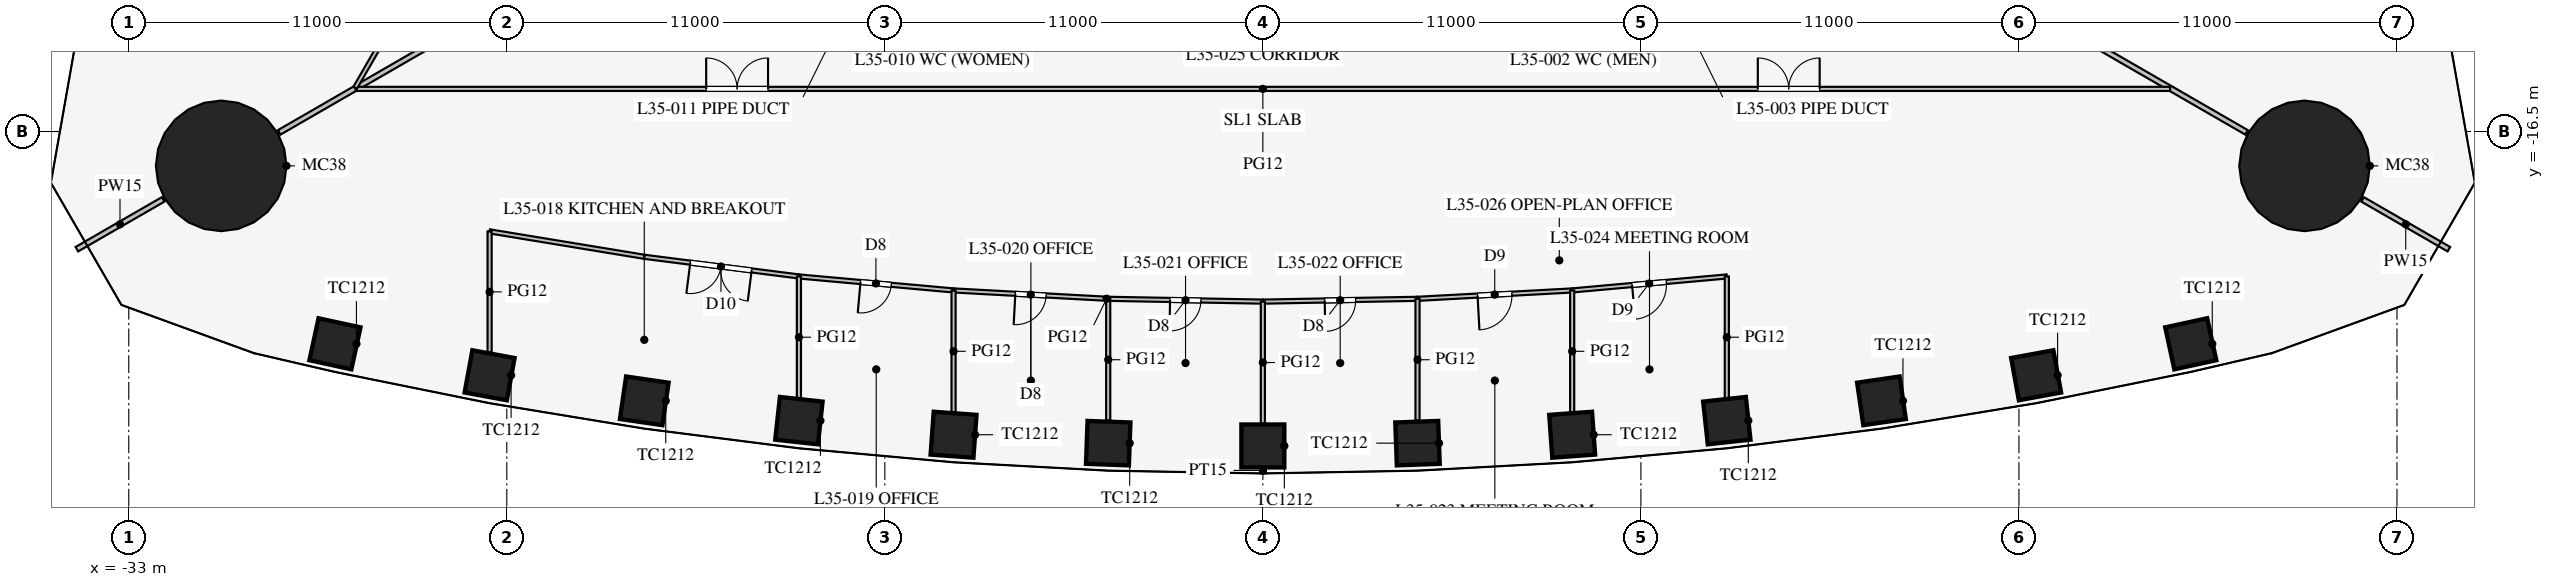
"""IFC4 building model, lengths in metres.
Left out: names, types, materials, properties, quantities, classifications, styles, units other than length and angle.
Written with IfcOpenShell. Run it as: python <this file> out.ifc"""

import sys

from ifc_helpers import new_model, si_unit, direction, frame, frame_2d, origin, origin_2d, place, context, subcontext, project, spatial, rectangle, circle, extrude, element, fill, save


model = new_model("IFC4")
c1 = context("Model", 3, precision=1e-05, world=origin(), true_north=direction((0.0, 1.0)))
c2 = subcontext(c1, "Body", "Model", "MODEL_VIEW")
j1 = project(units=[si_unit("LENGTHUNIT", "METRE"), si_unit("PLANEANGLEUNIT", "RADIAN")], contexts=[c1])
p1 = place(None, origin())
s1 = spatial("IfcSite", under=j1, at=p1, CompositionType="ELEMENT")
p2 = place(p1, origin())
s2 = spatial("IfcBuilding", under=s1, at=p2, CompositionType="ELEMENT")
p3 = place(p2, frame((0.0, 0.0, 153.5)))
s3 = spatial("IfcBuildingStorey", under=s2, at=p3, CompositionType="ELEMENT", Elevation=153.5)
for number, where, z_axis, x_axis in (
    (1, (-27.0, -22.677, 0.0), (0.0, 0.0, 1.0), (0.977, -0.212, 0.0)),
    (2, (-22.5, -23.593, 0.0), (0.0, 0.0, 1.0), (0.984, -0.18, 0.0)),
    (3, (-18.0, -24.337, 0.0), (0.0, 0.0, 1.0), (0.99, -0.144, 0.0)),
    (4, (-13.5, -24.913, 0.0), (0.0, 0.0, 1.0), (0.994, -0.108, 0.0)),
    (5, (-9.0, -25.323, 0.0), (0.0, 0.0, 1.0), (0.997, -0.072, 0.0)),
    (6, (-4.5, -25.568, 0.0), (0.0, 0.0, 1.0), (0.999, -0.036, 0.0)),
    (7, (0.0, -25.65, 0.0), (0.0, 0.0, 1.0), (1.0, 0.0, 0.0)),
    (8, (4.5, -25.568, 0.0), (0.0, 0.0, 1.0), (0.999, 0.036, 0.0)),
    (9, (9.0, -25.323, 0.0), (0.0, 0.0, 1.0), (0.997, 0.072, 0.0)),
    (10, (13.5, -24.913, 0.0), (0.0, 0.0, 1.0), (0.994, 0.108, 0.0)),
    (11, (18.0, -24.337, 0.0), (0.0, 0.0, 1.0), (0.99, 0.144, 0.0)),
    (12, (22.5, -23.593, 0.0), (0.0, 0.0, 1.0), (0.984, 0.18, 0.0)),
    (13, (27.0, -22.677, 0.0), (0.0, 0.0, 1.0), (0.977, 0.212, 0.0)),
):
    element("IfcColumn", number, at=place(p3, frame(where, z_axis=z_axis, x_axis=x_axis)), inside=s3, PredefinedType="COLUMN", context=c2, shape_type="SweptSolid", body=[
        extrude(rectangle(XDim=1.25, YDim=1.25, at=origin_2d()), origin(), (0.0, 0.0, 1.0), 4.2),
    ])
for number, where, z_axis, x_axis in (
    (14, (30.311, -17.5, 0.0), (0.0, 0.0, 1.0), (1.0, 0.0, 0.0)),
    (15, (-30.311, -17.5, 0.0), (0.0, 0.0, 1.0), (1.0, 0.0, 0.0)),
):
    element("IfcColumn", number, at=place(p3, frame(where, z_axis=z_axis, x_axis=x_axis)), inside=s3, PredefinedType="COLUMN", context=c2, shape_type="SweptSolid", body=[
        extrude(circle(Radius=1.9, at=origin_2d()), origin(), (0.0, 0.0, 1.0), 4.2),
    ])
p4 = place(p3, frame((14.203, -8.2, 0.0), z_axis=(0.0, 0.0, 1.0), x_axis=(0.866024668836, -0.500001272966, 0.0)))
e16 = element("IfcWall", 16, at=p4, inside=s3, PredefinedType="PARTITIONING", context=c2, shape_type="SweptSolid", body=[
    extrude(rectangle(XDim=16.65, YDim=0.15, at=frame_2d((8.325, 0.0))), origin(), (0.0, 0.0, 1.0), 2.3),
])
p5 = place(p3, frame((32.0, -18.475, 0.0), z_axis=(0.0, 0.0, 1.0), x_axis=(0.866042548026, -0.499970304126, 0.0)))
e17 = element("IfcWall", 17, at=p5, inside=s3, PredefinedType="PARTITIONING", context=c2, shape_type="SweptSolid", body=[
    extrude(rectangle(XDim=2.899, YDim=0.15, at=frame_2d((1.45, 0.0))), origin(), (0.0, 0.0, 1.0), 2.3),
])
p6 = place(p3, frame((-14.203, -8.2, 0.0), z_axis=(0.0, 0.0, 1.0), x_axis=(-0.866024668836, -0.500001272966, 0.0)))
e18 = element("IfcWall", 18, at=p6, inside=s3, PredefinedType="PARTITIONING", context=c2, shape_type="SweptSolid", body=[
    extrude(rectangle(XDim=16.65, YDim=0.15, at=frame_2d((8.325, 0.0))), origin(), (0.0, 0.0, 1.0), 2.3),
])
p7 = place(p3, frame((-32.0, -18.475, 0.0), z_axis=(0.0, 0.0, 1.0), x_axis=(-0.866042548026, -0.499970304126, 0.0)))
e19 = element("IfcWall", 19, at=p7, inside=s3, PredefinedType="PARTITIONING", context=c2, shape_type="SweptSolid", body=[
    extrude(rectangle(XDim=2.899, YDim=0.15, at=frame_2d((1.45, 0.0))), origin(), (0.0, 0.0, 1.0), 2.3),
])
p8 = place(p3, frame((-26.398, -15.26, 0.0), z_axis=(0.0, 0.0, 1.0), x_axis=(1.0, 0.0, 0.0)))
e20 = element("IfcWall", 20, at=p8, inside=s3, PredefinedType="PARTITIONING", context=c2, shape_type="SweptSolid", body=[
    extrude(rectangle(XDim=52.796, YDim=0.12, at=frame_2d((26.398, 0.0))), origin(), (0.0, 0.0, 1.0), 2.9),
])
p9 = place(p8, frame((10.2, 0.0, 0.15)))
e21 = element("IfcOpeningElement", 21, at=p9, cuts=e20, PredefinedType="OPENING", context=c2, shape_type="SweptSolid", body=[
    extrude(rectangle(XDim=1.8, YDim=2.1, at=frame_2d((0.9, 1.05))), frame((0.0, 0.07, 0.0), z_axis=(0.0, -1.0, 0.0), x_axis=(1.0, 0.0, 0.0)), (0.0, 0.0, 1.0), 0.14),
])
p10 = place(p8, frame((40.8, 0.0, 0.15)))
e22 = element("IfcOpeningElement", 22, at=p10, cuts=e20, PredefinedType="OPENING", context=c2, shape_type="SweptSolid", body=[
    extrude(rectangle(XDim=1.8, YDim=2.1, at=frame_2d((0.9, 1.05))), frame((0.0, 0.07, 0.0), z_axis=(0.0, -1.0, 0.0), x_axis=(1.0, 0.0, 0.0)), (0.0, 0.0, 1.0), 0.14),
])
p11 = place(p3, frame((0.0, -26.279, 0.0), z_axis=(0.0, 0.0, 1.0), x_axis=(0.0, -1.0, 0.0)))
e23 = element("IfcWall", 23, at=p11, inside=s3, PredefinedType="PARTITIONING", context=c2, shape_type="SweptSolid", body=[
    extrude(rectangle(XDim=0.166, YDim=0.15, at=frame_2d((0.083, 0.0))), origin(), (0.0, 0.0, 1.0), 2.9),
])
p12 = place(p3, frame((0.0, -21.45, 0.0), z_axis=(0.0, 0.0, 1.0), x_axis=(0.999837820638, 0.018009231578, 0.0)))
e24 = element("IfcWall", 24, at=p12, inside=s3, PredefinedType="PARTITIONING", context=c2, shape_type="SweptSolid", body=[
    extrude(rectangle(XDim=4.501, YDim=0.12, at=frame_2d((2.25, 0.0))), origin(), (0.0, 0.0, 1.0), 2.9),
])
p13 = place(p12, frame((1.8, 0.0, 0.15)))
e25 = element("IfcOpeningElement", 25, at=p13, cuts=e24, PredefinedType="OPENING", context=c2, shape_type="SweptSolid", body=[
    extrude(rectangle(XDim=0.9, YDim=2.1, at=frame_2d((0.45, 1.05))), frame((0.0, 0.07, 0.0), z_axis=(0.0, -1.0, 0.0), x_axis=(1.0, 0.0, 0.0)), (0.0, 0.0, 1.0), 0.14),
])
p14 = place(p3, frame((4.5, -21.369, 0.0), z_axis=(0.0, 0.0, 1.0), x_axis=(0.998537376538, 0.054065771581, 0.0)))
e26 = element("IfcWall", 26, at=p14, inside=s3, PredefinedType="PARTITIONING", context=c2, shape_type="SweptSolid", body=[
    extrude(rectangle(XDim=4.507, YDim=0.12, at=frame_2d((2.253, 0.0))), origin(), (0.0, 0.0, 1.0), 2.9),
])
p15 = place(p14, frame((1.75, 0.0, 0.15)))
e27 = element("IfcOpeningElement", 27, at=p15, cuts=e26, PredefinedType="OPENING", context=c2, shape_type="SweptSolid", body=[
    extrude(rectangle(XDim=1.0, YDim=2.1, at=frame_2d((0.5, 1.05))), frame((0.0, 0.07, 0.0), z_axis=(0.0, -1.0, 0.0), x_axis=(1.0, 0.0, 0.0)), (0.0, 0.0, 1.0), 0.14),
])
p16 = place(p3, frame((9.0, -21.125, 0.0), z_axis=(0.0, 0.0, 1.0), x_axis=(0.995930325215, 0.090126507295, 0.0)))
e28 = element("IfcWall", 28, at=p16, inside=s3, PredefinedType="PARTITIONING", context=c2, shape_type="SweptSolid", body=[
    extrude(rectangle(XDim=4.518, YDim=0.12, at=frame_2d((2.259, 0.0))), origin(), (0.0, 0.0, 1.0), 2.9),
])
p17 = place(p16, frame((1.75, 0.0, 0.15)))
e29 = element("IfcOpeningElement", 29, at=p17, cuts=e28, PredefinedType="OPENING", context=c2, shape_type="SweptSolid", body=[
    extrude(rectangle(XDim=1.0, YDim=2.1, at=frame_2d((0.5, 1.05))), frame((0.0, 0.07, 0.0), z_axis=(0.0, -1.0, 0.0), x_axis=(1.0, 0.0, 0.0)), (0.0, 0.0, 1.0), 0.14),
])
p18 = place(p3, frame((-13.5, -20.718, 0.0), z_axis=(0.0, 0.0, 1.0), x_axis=(0.995930325215, -0.090126507295, 0.0)))
e30 = element("IfcWall", 30, at=p18, inside=s3, PredefinedType="PARTITIONING", context=c2, shape_type="SweptSolid", body=[
    extrude(rectangle(XDim=4.518, YDim=0.12, at=frame_2d((2.259, 0.0))), origin(), (0.0, 0.0, 1.0), 2.9),
])
p19 = place(p18, frame((1.8, 0.0, 0.15)))
e31 = element("IfcOpeningElement", 31, at=p19, cuts=e30, PredefinedType="OPENING", context=c2, shape_type="SweptSolid", body=[
    extrude(rectangle(XDim=0.9, YDim=2.1, at=frame_2d((0.45, 1.05))), frame((0.0, 0.07, 0.0), z_axis=(0.0, -1.0, 0.0), x_axis=(1.0, 0.0, 0.0)), (0.0, 0.0, 1.0), 0.14),
])
p20 = place(p3, frame((-18.0, -20.146, 0.0), z_axis=(0.0, 0.0, 1.0), x_axis=(0.992010652594, -0.12615413247, 0.0)))
e32 = element("IfcWall", 32, at=p20, inside=s3, PredefinedType="PARTITIONING", context=c2, shape_type="SweptSolid", body=[
    extrude(rectangle(XDim=4.536, YDim=0.12, at=frame_2d((2.268, 0.0))), origin(), (0.0, 0.0, 1.0), 2.9),
])
p21 = place(p20, frame((1.35, 0.0, 0.15)))
e33 = element("IfcOpeningElement", 33, at=p21, cuts=e32, PredefinedType="OPENING", context=c2, shape_type="SweptSolid", body=[
    extrude(rectangle(XDim=1.8, YDim=2.1, at=frame_2d((0.9, 1.05))), frame((0.0, 0.07, 0.0), z_axis=(0.0, -1.0, 0.0), x_axis=(1.0, 0.0, 0.0)), (0.0, 0.0, 1.0), 0.14),
])
p22 = place(p3, frame((-22.5, -19.406, 0.0), z_axis=(0.0, 0.0, 1.0), x_axis=(0.986764681833, -0.162158757664, 0.0)))
e34 = element("IfcWall", 34, at=p22, inside=s3, PredefinedType="PARTITIONING", context=c2, shape_type="SweptSolid", body=[
    extrude(rectangle(XDim=4.56, YDim=0.12, at=frame_2d((2.28, 0.0))), origin(), (0.0, 0.0, 1.0), 2.9),
])
p23 = place(p3, frame((-4.5, -21.369, 0.0), z_axis=(0.0, 0.0, 1.0), x_axis=(0.999837820638, -0.018009231578, 0.0)))
e35 = element("IfcWall", 35, at=p23, inside=s3, PredefinedType="PARTITIONING", context=c2, shape_type="SweptSolid", body=[
    extrude(rectangle(XDim=4.501, YDim=0.12, at=frame_2d((2.25, 0.0))), origin(), (0.0, 0.0, 1.0), 2.9),
])
p24 = place(p23, frame((1.8, 0.0, 0.15)))
e36 = element("IfcOpeningElement", 36, at=p24, cuts=e35, PredefinedType="OPENING", context=c2, shape_type="SweptSolid", body=[
    extrude(rectangle(XDim=0.9, YDim=2.1, at=frame_2d((0.45, 1.05))), frame((0.0, 0.07, 0.0), z_axis=(0.0, -1.0, 0.0), x_axis=(1.0, 0.0, 0.0)), (0.0, 0.0, 1.0), 0.14),
])
p25 = place(p3, frame((-9.0, -21.125, 0.0), z_axis=(0.0, 0.0, 1.0), x_axis=(0.998537376538, -0.054065771581, 0.0)))
e37 = element("IfcWall", 37, at=p25, inside=s3, PredefinedType="PARTITIONING", context=c2, shape_type="SweptSolid", body=[
    extrude(rectangle(XDim=4.507, YDim=0.12, at=frame_2d((2.253, 0.0))), origin(), (0.0, 0.0, 1.0), 2.9),
])
p26 = place(p25, frame((1.8, 0.0, 0.15)))
e38 = element("IfcOpeningElement", 38, at=p26, cuts=e37, PredefinedType="OPENING", context=c2, shape_type="SweptSolid", body=[
    extrude(rectangle(XDim=0.9, YDim=2.1, at=frame_2d((0.45, 1.05))), frame((0.0, 0.07, 0.0), z_axis=(0.0, -1.0, 0.0), x_axis=(1.0, 0.0, 0.0)), (0.0, 0.0, 1.0), 0.14),
])
p27 = place(p3, frame((0.0, -21.45, 0.0), z_axis=(0.0, 0.0, 1.0), x_axis=(0.0, -1.0, 0.0)))
e39 = element("IfcWall", 39, at=p27, inside=s3, PredefinedType="PARTITIONING", context=c2, shape_type="SweptSolid", body=[
    extrude(rectangle(XDim=3.545, YDim=0.12, at=frame_2d((1.772, 0.0))), origin(), (0.0, 0.0, 1.0), 2.8),
])
p28 = place(p3, frame((13.5, -20.718, 0.0), z_axis=(0.0, 0.0, 1.0), x_axis=(0.0, -1.0, 0.0)))
e40 = element("IfcWall", 40, at=p28, inside=s3, PredefinedType="PARTITIONING", context=c2, shape_type="SweptSolid", body=[
    extrude(rectangle(XDim=3.537, YDim=0.12, at=frame_2d((1.768, 0.0))), origin(), (0.0, 0.0, 1.0), 2.6),
])
p29 = place(p3, frame((4.5, -21.369, 0.0), z_axis=(0.0, 0.0, 1.0), x_axis=(0.0, -1.0, 0.0)))
e41 = element("IfcWall", 41, at=p29, inside=s3, PredefinedType="PARTITIONING", context=c2, shape_type="SweptSolid", body=[
    extrude(rectangle(XDim=3.544, YDim=0.12, at=frame_2d((1.772, 0.0))), origin(), (0.0, 0.0, 1.0), 2.8),
])
p30 = place(p3, frame((9.0, -21.125, 0.0), z_axis=(0.0, 0.0, 1.0), x_axis=(0.0, -1.0, 0.0)))
e42 = element("IfcWall", 42, at=p30, inside=s3, PredefinedType="PARTITIONING", context=c2, shape_type="SweptSolid", body=[
    extrude(rectangle(XDim=3.541, YDim=0.12, at=frame_2d((1.771, 0.0))), origin(), (0.0, 0.0, 1.0), 2.9),
])
p31 = place(p3, frame((-13.5, -20.718, 0.0), z_axis=(0.0, 0.0, 1.0), x_axis=(0.0, -1.0, 0.0)))
e43 = element("IfcWall", 43, at=p31, inside=s3, PredefinedType="PARTITIONING", context=c2, shape_type="SweptSolid", body=[
    extrude(rectangle(XDim=3.537, YDim=0.12, at=frame_2d((1.768, 0.0))), origin(), (0.0, 0.0, 1.0), 2.6),
])
p32 = place(p3, frame((-22.5, -19.406, 0.0), z_axis=(0.0, 0.0, 1.0), x_axis=(0.0, -1.0, 0.0)))
e44 = element("IfcWall", 44, at=p32, inside=s3, PredefinedType="PARTITIONING", context=c2, shape_type="SweptSolid", body=[
    extrude(rectangle(XDim=3.521, YDim=0.12, at=frame_2d((1.76, 0.0))), origin(), (0.0, 0.0, 1.0), 2.9),
])
p33 = place(p3, frame((-4.5, -21.369, 0.0), z_axis=(0.0, 0.0, 1.0), x_axis=(0.0, -1.0, 0.0)))
e45 = element("IfcWall", 45, at=p33, inside=s3, PredefinedType="PARTITIONING", context=c2, shape_type="SweptSolid", body=[
    extrude(rectangle(XDim=3.544, YDim=0.12, at=frame_2d((1.772, 0.0))), origin(), (0.0, 0.0, 1.0), 2.8),
])
p34 = place(p3, frame((-9.0, -21.125, 0.0), z_axis=(0.0, 0.0, 1.0), x_axis=(0.0, -1.0, 0.0)))
e46 = element("IfcWall", 46, at=p34, inside=s3, PredefinedType="PARTITIONING", context=c2, shape_type="SweptSolid", body=[
    extrude(rectangle(XDim=3.541, YDim=0.12, at=frame_2d((1.771, 0.0))), origin(), (0.0, 0.0, 1.0), 2.9),
])
p35 = place(p3, frame((-0.016, 30.491, 0.0), z_axis=(0.0, 0.0, 1.0), x_axis=(-0.50000091641, -0.866024874695, 0.0)))
e47 = element("IfcWall", 47, at=p35, inside=s3, PredefinedType="PARTITIONING", context=c2, shape_type="SweptSolid", body=[
    extrude(rectangle(XDim=52.796, YDim=0.12, at=frame_2d((26.398, 0.0))), origin(), (0.0, 0.0, 1.0), 2.9),
])
p36 = place(p35, frame((10.2, 0.0, 0.15)))
e48 = element("IfcOpeningElement", 48, at=p36, cuts=e47, PredefinedType="OPENING", context=c2, shape_type="SweptSolid", body=[
    extrude(rectangle(XDim=1.8, YDim=2.1, at=frame_2d((0.9, 1.05))), frame((0.0, 0.07, 0.0), z_axis=(0.0, -1.0, 0.0), x_axis=(1.0, 0.0, 0.0)), (0.0, 0.0, 1.0), 0.14),
])
p37 = place(p35, frame((40.8, 0.0, 0.15)))
e49 = element("IfcOpeningElement", 49, at=p37, cuts=e47, PredefinedType="OPENING", context=c2, shape_type="SweptSolid", body=[
    extrude(rectangle(XDim=1.8, YDim=2.1, at=frame_2d((0.9, 1.05))), frame((0.0, 0.07, 0.0), z_axis=(0.0, -1.0, 0.0), x_axis=(1.0, 0.0, 0.0)), (0.0, 0.0, 1.0), 0.14),
])
p38 = place(p21, frame((1.8, 0.0, 0.0), z_axis=(0.0, 0.0, 1.0), x_axis=(-1.0, 0.0, 0.0)))
e50 = element("IfcDoor", 50, at=p38, inside=s3, OperationType="DOUBLE_DOOR_SINGLE_SWING", PredefinedType="DOOR", context=c2, shape_type="SweptSolid", body=[
    extrude(rectangle(XDim=1.8, YDim=2.1, at=frame_2d((0.9, 1.05))), frame((0.0, 0.025, 0.0), z_axis=(0.0, -1.0, 0.0), x_axis=(1.0, 0.0, 0.0)), (0.0, 0.0, 1.0), 0.05),
])
fill(e33, e50)
p39 = place(p19, frame((0.9, 0.0, 0.0), z_axis=(0.0, 0.0, 1.0), x_axis=(-1.0, 0.0, 0.0)))
e51 = element("IfcDoor", 51, at=p39, inside=s3, OperationType="SINGLE_SWING_RIGHT", PredefinedType="DOOR", context=c2, shape_type="SweptSolid", body=[
    extrude(rectangle(XDim=0.9, YDim=2.1, at=frame_2d((0.45, 1.05))), frame((0.0, 0.025, 0.0), z_axis=(0.0, -1.0, 0.0), x_axis=(1.0, 0.0, 0.0)), (0.0, 0.0, 1.0), 0.05),
])
fill(e31, e51)
p40 = place(p26, frame((0.9, 0.0, 0.0), z_axis=(0.0, 0.0, 1.0), x_axis=(-1.0, 0.0, 0.0)))
e52 = element("IfcDoor", 52, at=p40, inside=s3, OperationType="SINGLE_SWING_RIGHT", PredefinedType="DOOR", context=c2, shape_type="SweptSolid", body=[
    extrude(rectangle(XDim=0.9, YDim=2.1, at=frame_2d((0.45, 1.05))), frame((0.0, 0.025, 0.0), z_axis=(0.0, -1.0, 0.0), x_axis=(1.0, 0.0, 0.0)), (0.0, 0.0, 1.0), 0.05),
])
fill(e38, e52)
p41 = place(p24, frame((0.9, 0.0, 0.0), z_axis=(0.0, 0.0, 1.0), x_axis=(-1.0, 0.0, 0.0)))
e53 = element("IfcDoor", 53, at=p41, inside=s3, OperationType="SINGLE_SWING_RIGHT", PredefinedType="DOOR", context=c2, shape_type="SweptSolid", body=[
    extrude(rectangle(XDim=0.9, YDim=2.1, at=frame_2d((0.45, 1.05))), frame((0.0, 0.025, 0.0), z_axis=(0.0, -1.0, 0.0), x_axis=(1.0, 0.0, 0.0)), (0.0, 0.0, 1.0), 0.05),
])
fill(e36, e53)
p42 = place(p13, frame((0.9, 0.0, 0.0), z_axis=(0.0, 0.0, 1.0), x_axis=(-1.0, 0.0, 0.0)))
e54 = element("IfcDoor", 54, at=p42, inside=s3, OperationType="SINGLE_SWING_RIGHT", PredefinedType="DOOR", context=c2, shape_type="SweptSolid", body=[
    extrude(rectangle(XDim=0.9, YDim=2.1, at=frame_2d((0.45, 1.05))), frame((0.0, 0.025, 0.0), z_axis=(0.0, -1.0, 0.0), x_axis=(1.0, 0.0, 0.0)), (0.0, 0.0, 1.0), 0.05),
])
fill(e25, e54)
p43 = place(p15, frame((1.0, 0.0, 0.0), z_axis=(0.0, 0.0, 1.0), x_axis=(-1.0, 0.0, 0.0)))
e55 = element("IfcDoor", 55, at=p43, inside=s3, OperationType="SINGLE_SWING_RIGHT", PredefinedType="DOOR", context=c2, shape_type="SweptSolid", body=[
    extrude(rectangle(XDim=1.0, YDim=2.1, at=frame_2d((0.5, 1.05))), frame((0.0, 0.025, 0.0), z_axis=(0.0, -1.0, 0.0), x_axis=(1.0, 0.0, 0.0)), (0.0, 0.0, 1.0), 0.05),
])
fill(e27, e55)
p44 = place(p17, frame((1.0, 0.0, 0.0), z_axis=(0.0, 0.0, 1.0), x_axis=(-1.0, 0.0, 0.0)))
e56 = element("IfcDoor", 56, at=p44, inside=s3, OperationType="SINGLE_SWING_RIGHT", PredefinedType="DOOR", context=c2, shape_type="SweptSolid", body=[
    extrude(rectangle(XDim=1.0, YDim=2.1, at=frame_2d((0.5, 1.05))), frame((0.0, 0.025, 0.0), z_axis=(0.0, -1.0, 0.0), x_axis=(1.0, 0.0, 0.0)), (0.0, 0.0, 1.0), 0.05),
])
fill(e29, e56)
p45 = place(p9, origin())
e57 = element("IfcDoor", 57, at=p45, inside=s3, OperationType="DOUBLE_DOOR_SINGLE_SWING", PredefinedType="DOOR", context=c2, shape_type="SweptSolid", body=[
    extrude(rectangle(XDim=1.8, YDim=2.1, at=frame_2d((0.9, 1.05))), frame((0.0, 0.025, 0.0), z_axis=(0.0, -1.0, 0.0), x_axis=(1.0, 0.0, 0.0)), (0.0, 0.0, 1.0), 0.05),
])
fill(e21, e57)
p46 = place(p10, origin())
e58 = element("IfcDoor", 58, at=p46, inside=s3, OperationType="DOUBLE_DOOR_SINGLE_SWING", PredefinedType="DOOR", context=c2, shape_type="SweptSolid", body=[
    extrude(rectangle(XDim=1.8, YDim=2.1, at=frame_2d((0.9, 1.05))), frame((0.0, 0.025, 0.0), z_axis=(0.0, -1.0, 0.0), x_axis=(1.0, 0.0, 0.0)), (0.0, 0.0, 1.0), 0.05),
])
fill(e22, e58)
save(model, sys.argv[1])
